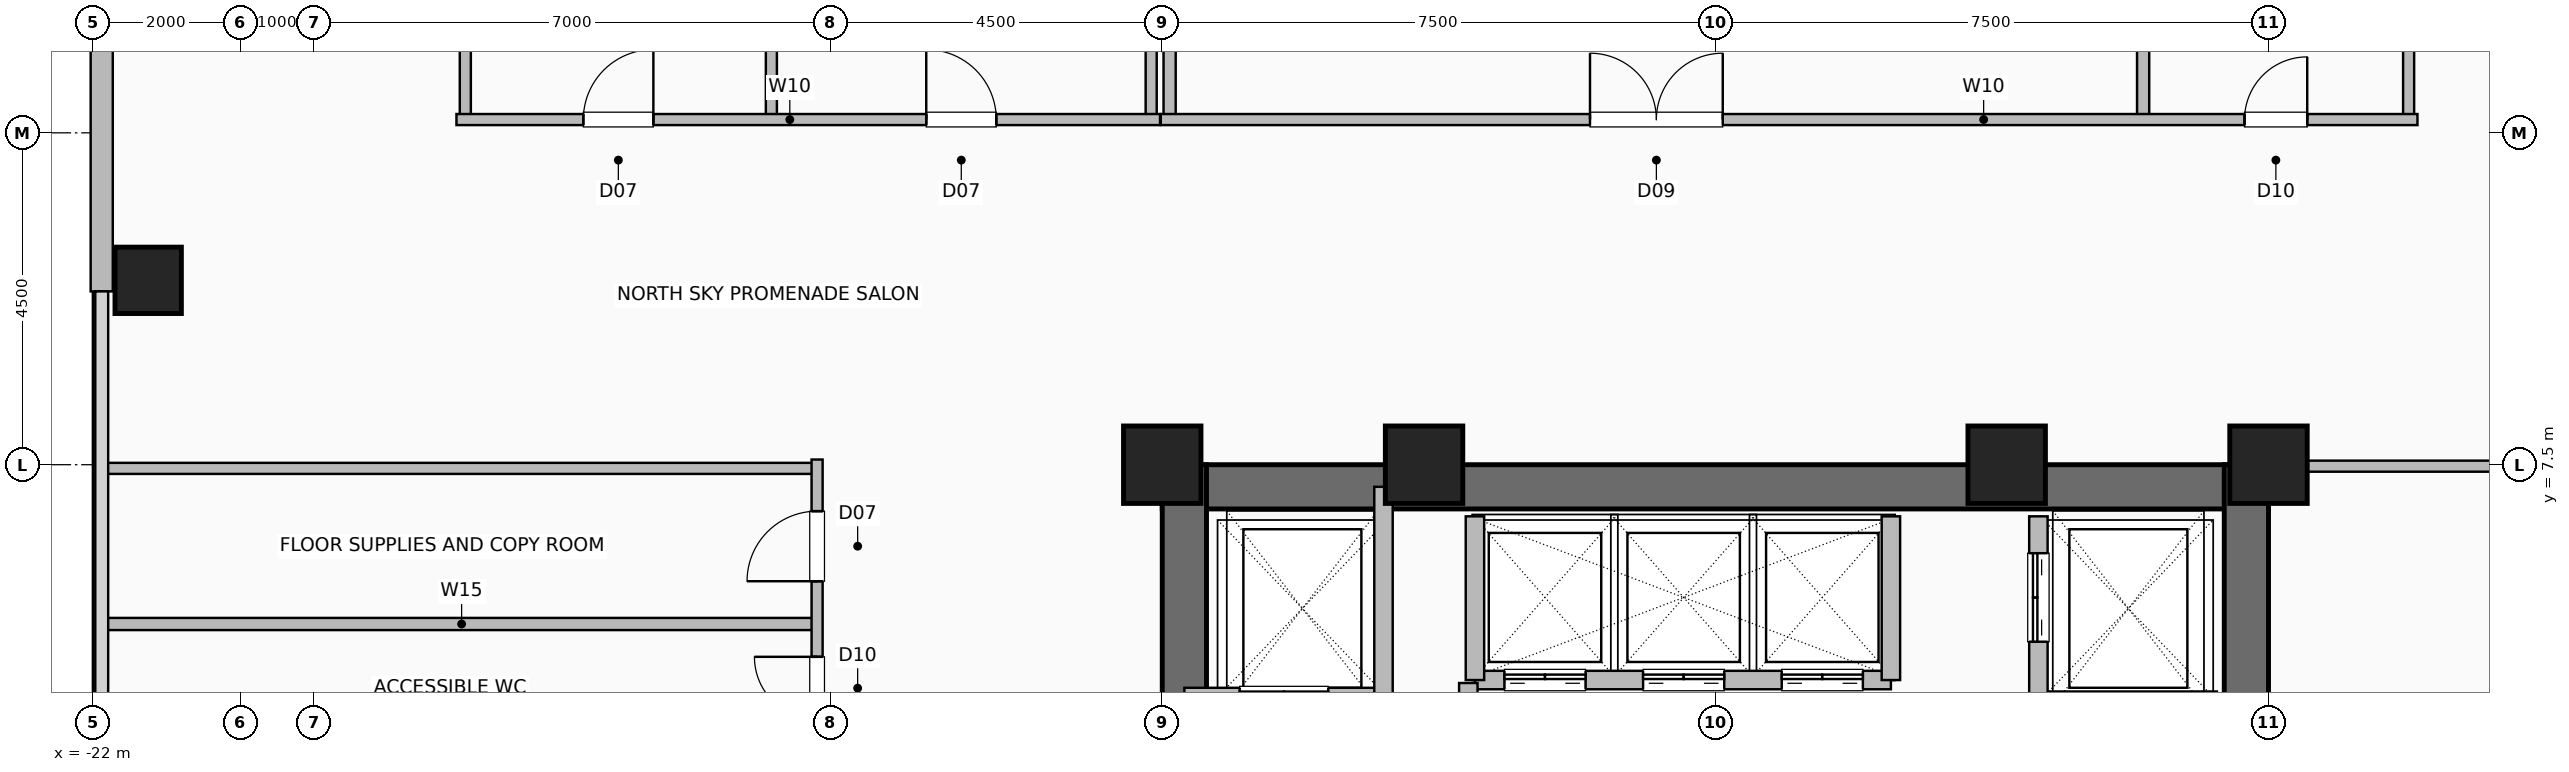
"""IFC4 building model, lengths in metres.
Left out: names, types, materials, properties, quantities, classifications, styles, units other than length and angle.
Written with IfcOpenShell. Run it as: python <this file> out.ifc"""

import sys

from ifc_helpers import new_model, si_unit, direction, frame, frame_2d, origin, origin_2d, place, context, subcontext, project, spatial, rectangle, hollow_rectangle, extrude, element, fill, save


model = new_model("IFC4")
c1 = context("Model", 3, precision=1e-05, world=origin(), true_north=direction((0.0, 1.0)))
c2 = subcontext(c1, "Body", "Model", "MODEL_VIEW")
j1 = project(units=[si_unit("LENGTHUNIT", "METRE"), si_unit("PLANEANGLEUNIT", "RADIAN")], contexts=[c1])
p1 = place(None, origin())
s1 = spatial("IfcSite", under=j1, at=p1, CompositionType="ELEMENT")
p2 = place(p1, origin())
s2 = spatial("IfcBuilding", under=s1, at=p2, CompositionType="ELEMENT")
p3 = place(p2, frame((0.0, 0.0, 144.4)))
s3 = spatial("IfcBuildingStorey", under=s2, at=p3, CompositionType="ELEMENT", Elevation=144.4)
for number, where, z_axis, x_axis in (
    (1, (7.5, 7.5, 0.0), (0.0, 0.0, 1.0), (1.0, 0.0, 0.0)),
    (2, (3.95, 7.5, 0.0), (0.0, 0.0, 1.0), (1.0, 0.0, 0.0)),
    (3, (-3.95, 7.5, 0.0), (0.0, 0.0, 1.0), (1.0, 0.0, 0.0)),
    (4, (-7.5, 7.5, 0.0), (0.0, 0.0, 1.0), (1.0, 0.0, 0.0)),
):
    element("IfcColumn", number, at=place(p3, frame(where, z_axis=z_axis, x_axis=x_axis)), inside=s3, PredefinedType="COLUMN", context=c2, shape_type="SweptSolid", body=[
        extrude(hollow_rectangle(XDim=1.05, YDim=1.05, WallThickness=0.05, at=origin_2d()), origin(), (0.0, 0.0, 1.0), 3.6),
    ])
p4 = place(p3, frame((-21.25, 10.0, 0.0), z_axis=(0.0, 0.0, 1.0), x_axis=(1.0, 0.0, 0.0)))
e5 = element("IfcColumn", 5, at=p4, inside=s3, PredefinedType="COLUMN", context=c2, shape_type="SweptSolid", body=[
    extrude(hollow_rectangle(XDim=0.9, YDim=0.9, WallThickness=0.045, at=origin_2d()), origin(), (0.0, 0.0, 1.0), 3.6),
])
p5 = place(p3, frame((-21.88, 9.85, 0.0), z_axis=(0.0, 0.0, 1.0), x_axis=(0.0, 1.0, 0.0)))
e6 = element("IfcWall", 6, at=p5, inside=s3, PredefinedType="SOLIDWALL", context=c2, shape_type="SweptSolid", body=[
    extrude(rectangle(XDim=6.3, YDim=0.3, at=frame_2d((3.15, 0.0))), origin(), (0.0, 0.0, 1.0), 3.36),
])
p6 = place(p3, frame((-7.5, 7.2, 0.0), z_axis=(0.0, 0.0, 1.0), x_axis=(1.0, 0.0, 0.0)))
e7 = element("IfcWall", 7, at=p6, inside=s3, PredefinedType="SHEAR", context=c2, shape_type="SweptSolid", body=[
    extrude(rectangle(XDim=15.0, YDim=0.6, at=frame_2d((7.5, 0.0))), origin(), (0.0, 0.0, 1.0), 3.36),
])
p7 = place(p3, frame((-7.2, -7.5, 0.0), z_axis=(0.0, 0.0, 1.0), x_axis=(0.0, 1.0, 0.0)))
e8 = element("IfcWall", 8, at=p7, inside=s3, PredefinedType="SHEAR", context=c2, shape_type="SweptSolid", body=[
    extrude(rectangle(XDim=15.0, YDim=0.6, at=frame_2d((7.5, 0.0))), origin(), (0.0, 0.0, 1.0), 3.36),
])
p8 = place(p7, frame((9.5, 0.0, 0.0)))
e9 = element("IfcOpeningElement", 9, at=p8, cuts=e8, PredefinedType="OPENING", context=c2, shape_type="SweptSolid", body=[
    extrude(rectangle(XDim=1.0, YDim=2.08, at=frame_2d((0.5, 1.04))), frame((0.0, 0.31, 0.0), z_axis=(0.0, -1.0, 0.0), x_axis=(1.0, 0.0, 0.0)), (0.0, 0.0, 1.0), 0.62),
])
p9 = place(p3, frame((7.2, -7.5, 0.0), z_axis=(0.0, 0.0, 1.0), x_axis=(0.0, 1.0, 0.0)))
e10 = element("IfcWall", 10, at=p9, inside=s3, PredefinedType="SHEAR", context=c2, shape_type="SweptSolid", body=[
    extrude(rectangle(XDim=15.0, YDim=0.6, at=frame_2d((7.5, 0.0))), origin(), (0.0, 0.0, 1.0), 3.36),
])
p10 = place(p3, frame((-3.26, 4.58, 0.0), z_axis=(0.0, 0.0, 1.0), x_axis=(1.0, 0.0, 0.0)))
e11 = element("IfcWall", 11, at=p10, inside=s3, PredefinedType="SHEAR", context=c2, shape_type="SweptSolid", body=[
    extrude(rectangle(XDim=5.64, YDim=0.25, at=frame_2d((2.82, 0.0))), origin(), (0.0, 0.0, 1.0), 3.36),
])
p11 = place(p10, frame((0.4, 0.0, 0.0)))
e12 = element("IfcOpeningElement", 12, at=p11, cuts=e11, PredefinedType="OPENING", context=c2, shape_type="SweptSolid", body=[
    extrude(rectangle(XDim=1.1, YDim=2.2, at=frame_2d((0.55, 1.1))), frame((0.0, 0.135, 0.0), z_axis=(0.0, -1.0, 0.0), x_axis=(1.0, 0.0, 0.0)), (0.0, 0.0, 1.0), 0.27),
])
p12 = place(p10, frame((2.28, 0.0, 0.0)))
e13 = element("IfcOpeningElement", 13, at=p12, cuts=e11, PredefinedType="OPENING", context=c2, shape_type="SweptSolid", body=[
    extrude(rectangle(XDim=1.1, YDim=2.2, at=frame_2d((0.55, 1.1))), frame((0.0, 0.135, 0.0), z_axis=(0.0, -1.0, 0.0), x_axis=(1.0, 0.0, 0.0)), (0.0, 0.0, 1.0), 0.27),
])
p13 = place(p10, frame((4.16, 0.0, 0.0)))
e14 = element("IfcOpeningElement", 14, at=p13, cuts=e11, PredefinedType="OPENING", context=c2, shape_type="SweptSolid", body=[
    extrude(rectangle(XDim=1.1, YDim=2.2, at=frame_2d((0.55, 1.1))), frame((0.0, 0.135, 0.0), z_axis=(0.0, -1.0, 0.0), x_axis=(1.0, 0.0, 0.0)), (0.0, 0.0, 1.0), 0.27),
])
for number, where, z_axis, x_axis in (
    (15, (-3.26, 4.58, 0.0), (0.0, 0.0, 1.0), (0.0, 1.0, 0.0)),
    (16, (2.38, 4.58, 0.0), (0.0, 0.0, 1.0), (0.0, 1.0, 0.0)),
):
    element("IfcWall", number, at=place(p3, frame(where, z_axis=z_axis, x_axis=x_axis)), inside=s3, PredefinedType="SHEAR", context=c2, shape_type="SweptSolid", body=[
        extrude(rectangle(XDim=2.22, YDim=0.25, at=frame_2d((1.11, 0.0))), origin(), (0.0, 0.0, 1.0), 3.36),
    ])
p14 = place(p3, frame((-7.2, 4.35, 0.0), z_axis=(0.0, 0.0, 1.0), x_axis=(1.0, 0.0, 0.0)))
e17 = element("IfcWall", 17, at=p14, inside=s3, PredefinedType="SHEAR", context=c2, shape_type="SweptSolid", body=[
    extrude(rectangle(XDim=2.7, YDim=0.25, at=frame_2d((1.35, 0.0))), origin(), (0.0, 0.0, 1.0), 3.36),
])
p15 = place(p14, frame((0.75, 0.0, 0.0)))
e18 = element("IfcOpeningElement", 18, at=p15, cuts=e17, PredefinedType="OPENING", context=c2, shape_type="SweptSolid", body=[
    extrude(rectangle(XDim=1.2, YDim=2.2, at=frame_2d((0.6, 1.1))), frame((0.0, 0.135, 0.0), z_axis=(0.0, -1.0, 0.0), x_axis=(1.0, 0.0, 0.0)), (0.0, 0.0, 1.0), 0.27),
])
p16 = place(p3, frame((-4.5, 4.35, 0.0), z_axis=(0.0, 0.0, 1.0), x_axis=(0.0, 1.0, 0.0)))
e19 = element("IfcWall", 19, at=p16, inside=s3, PredefinedType="SHEAR", context=c2, shape_type="SweptSolid", body=[
    extrude(rectangle(XDim=2.85, YDim=0.25, at=frame_2d((1.425, 0.0))), origin(), (0.0, 0.0, 1.0), 3.36),
])
p17 = place(p3, frame((4.38, 4.3, 0.0), z_axis=(0.0, 0.0, 1.0), x_axis=(1.0, 0.0, 0.0)))
e20 = element("IfcWall", 20, at=p17, inside=s3, PredefinedType="SHEAR", context=c2, shape_type="SweptSolid", body=[
    extrude(rectangle(XDim=2.42, YDim=0.25, at=frame_2d((1.21, 0.0))), origin(), (0.0, 0.0, 1.0), 3.36),
])
p18 = place(p3, frame((4.38, 4.3, 0.0), z_axis=(0.0, 0.0, 1.0), x_axis=(0.0, 1.0, 0.0)))
e21 = element("IfcWall", 21, at=p18, inside=s3, PredefinedType="SHEAR", context=c2, shape_type="SweptSolid", body=[
    extrude(rectangle(XDim=2.5, YDim=0.25, at=frame_2d((1.25, 0.0))), origin(), (0.0, 0.0, 1.0), 3.36),
])
p19 = place(p18, frame((0.8, 0.0, 0.0)))
e22 = element("IfcOpeningElement", 22, at=p19, cuts=e21, PredefinedType="OPENING", context=c2, shape_type="SweptSolid", body=[
    extrude(rectangle(XDim=1.2, YDim=2.2, at=frame_2d((0.6, 1.1))), frame((0.0, 0.135, 0.0), z_axis=(0.0, -1.0, 0.0), x_axis=(1.0, 0.0, 0.0)), (0.0, 0.0, 1.0), 0.27),
])
p20 = place(p3, frame((-3.35, 0.92, 0.0), z_axis=(0.0, 0.0, 1.0), x_axis=(0.0, 1.0, 0.0)))
e23 = element("IfcWall", 23, at=p20, inside=s3, PredefinedType="SHEAR", context=c2, shape_type="SweptSolid", body=[
    extrude(rectangle(XDim=3.62, YDim=0.25, at=frame_2d((1.81, 0.0))), origin(), (0.0, 0.0, 1.0), 3.36),
])
p21 = place(p20, frame((1.85, 0.0, 0.0)))
e24 = element("IfcOpeningElement", 24, at=p21, cuts=e23, PredefinedType="OPENING", context=c2, shape_type="SweptSolid", body=[
    extrude(rectangle(XDim=1.0, YDim=2.08, at=frame_2d((0.5, 1.04))), frame((0.0, 0.135, 0.0), z_axis=(0.0, -1.0, 0.0), x_axis=(1.0, 0.0, 0.0)), (0.0, 0.0, 1.0), 0.27),
])
p22 = place(p3, frame((-21.82, 5.34, 0.0), z_axis=(0.0, 0.0, 1.0), x_axis=(1.0, 0.0, 0.0)))
e25 = element("IfcWall", 25, at=p22, inside=s3, PredefinedType="PLUMBINGWALL", context=c2, shape_type="SweptSolid", body=[
    extrude(rectangle(XDim=9.64, YDim=0.165, at=frame_2d((4.82, 0.0))), origin(), (0.0, 0.0, 1.0), 3.36),
])
p23 = place(p3, frame((-21.82, 7.45, 0.0), z_axis=(0.0, 0.0, 1.0), x_axis=(1.0, 0.0, 0.0)))
e26 = element("IfcWall", 26, at=p23, inside=s3, PredefinedType="PARTITIONING", context=c2, shape_type="SweptSolid", body=[
    extrude(rectangle(XDim=9.64, YDim=0.15, at=frame_2d((4.82, 0.0))), origin(), (0.0, 0.0, 1.0), 3.36),
])
p24 = place(p3, frame((-12.18, -7.57, 0.0), z_axis=(0.0, 0.0, 1.0), x_axis=(0.0, 1.0, 0.0)))
e27 = element("IfcWall", 27, at=p24, inside=s3, PredefinedType="PARTITIONING", context=c2, shape_type="SweptSolid", body=[
    extrude(rectangle(XDim=15.14, YDim=0.15, at=frame_2d((7.57, 0.0))), origin(), (0.0, 0.0, 1.0), 3.36),
])
p25 = place(p24, frame((2.17, 0.0, 0.0)))
e28 = element("IfcOpeningElement", 28, at=p25, cuts=e27, PredefinedType="OPENING", context=c2, shape_type="SweptSolid", body=[
    extrude(rectangle(XDim=0.95, YDim=2.06, at=frame_2d((0.475, 1.03))), frame((0.0, 0.085, 0.0), z_axis=(0.0, -1.0, 0.0), x_axis=(1.0, 0.0, 0.0)), (0.0, 0.0, 1.0), 0.17),
])
p26 = place(p24, frame((7.695, 0.0, 0.0)))
e29 = element("IfcOpeningElement", 29, at=p26, cuts=e27, PredefinedType="OPENING", context=c2, shape_type="SweptSolid", body=[
    extrude(rectangle(XDim=0.95, YDim=2.06, at=frame_2d((0.475, 1.03))), frame((0.0, 0.085, 0.0), z_axis=(0.0, -1.0, 0.0), x_axis=(1.0, 0.0, 0.0)), (0.0, 0.0, 1.0), 0.17),
])
p27 = place(p24, frame((11.615, 0.0, 0.0)))
e30 = element("IfcOpeningElement", 30, at=p27, cuts=e27, PredefinedType="OPENING", context=c2, shape_type="SweptSolid", body=[
    extrude(rectangle(XDim=0.85, YDim=2.05, at=frame_2d((0.425, 1.025))), frame((0.0, 0.085, 0.0), z_axis=(0.0, -1.0, 0.0), x_axis=(1.0, 0.0, 0.0)), (0.0, 0.0, 1.0), 0.17),
])
p28 = place(p24, frame((13.49, 0.0, 0.0)))
e31 = element("IfcOpeningElement", 31, at=p28, cuts=e27, PredefinedType="OPENING", context=c2, shape_type="SweptSolid", body=[
    extrude(rectangle(XDim=0.95, YDim=2.06, at=frame_2d((0.475, 1.03))), frame((0.0, 0.085, 0.0), z_axis=(0.0, -1.0, 0.0), x_axis=(1.0, 0.0, 0.0)), (0.0, 0.0, 1.0), 0.17),
])
for number, where, z_axis, x_axis in (
    (32, (-16.95, 12.18, 0.0), (0.0, 0.0, 1.0), (0.0, 1.0, 0.0)),
    (33, (-12.8, 12.18, 0.0), (0.0, 0.0, 1.0), (0.0, 1.0, 0.0)),
    (34, (-7.65, 12.18, 0.0), (0.0, 0.0, 1.0), (0.0, 1.0, 0.0)),
):
    element("IfcWall", number, at=place(p3, frame(where, z_axis=z_axis, x_axis=x_axis)), inside=s3, PredefinedType="PARTITIONING", context=c2, shape_type="SweptSolid", body=[
        extrude(rectangle(XDim=9.64, YDim=0.15, at=frame_2d((4.82, 0.0))), origin(), (0.0, 0.0, 1.0), 3.36),
    ])
p29 = place(p3, frame((-17.07, 12.18, 0.0), z_axis=(0.0, 0.0, 1.0), x_axis=(1.0, 0.0, 0.0)))
e35 = element("IfcWall", 35, at=p29, inside=s3, PredefinedType="PARTITIONING", context=c2, shape_type="SweptSolid", body=[
    extrude(rectangle(XDim=9.54, YDim=0.15, at=frame_2d((4.77, 0.0))), origin(), (0.0, 0.0, 1.0), 3.36),
])
p30 = place(p29, frame((1.72, 0.0, 0.0)))
e36 = element("IfcOpeningElement", 36, at=p30, cuts=e35, PredefinedType="OPENING", context=c2, shape_type="SweptSolid", body=[
    extrude(rectangle(XDim=0.95, YDim=2.06, at=frame_2d((0.475, 1.03))), frame((0.0, 0.085, 0.0), z_axis=(0.0, -1.0, 0.0), x_axis=(1.0, 0.0, 0.0)), (0.0, 0.0, 1.0), 0.17),
])
p31 = place(p29, frame((6.37, 0.0, 0.0)))
e37 = element("IfcOpeningElement", 37, at=p31, cuts=e35, PredefinedType="OPENING", context=c2, shape_type="SweptSolid", body=[
    extrude(rectangle(XDim=0.95, YDim=2.06, at=frame_2d((0.475, 1.03))), frame((0.0, 0.085, 0.0), z_axis=(0.0, -1.0, 0.0), x_axis=(1.0, 0.0, 0.0)), (0.0, 0.0, 1.0), 0.17),
])
for number, where, z_axis, x_axis in (
    (38, (-7.4, 12.18, 0.0), (0.0, 0.0, 1.0), (0.0, 1.0, 0.0)),
    (39, (5.8, 12.18, 0.0), (0.0, 0.0, 1.0), (0.0, 1.0, 0.0)),
):
    element("IfcWall", number, at=place(p3, frame(where, z_axis=z_axis, x_axis=x_axis)), inside=s3, PredefinedType="PLUMBINGWALL", context=c2, shape_type="SweptSolid", body=[
        extrude(rectangle(XDim=9.64, YDim=0.165, at=frame_2d((4.82, 0.0))), origin(), (0.0, 0.0, 1.0), 3.36),
    ])
p32 = place(p3, frame((9.4, 12.18, 0.0), z_axis=(0.0, 0.0, 1.0), x_axis=(0.0, 1.0, 0.0)))
e40 = element("IfcWall", 40, at=p32, inside=s3, PredefinedType="PARTITIONING", context=c2, shape_type="SweptSolid", body=[
    extrude(rectangle(XDim=9.64, YDim=0.15, at=frame_2d((4.82, 0.0))), origin(), (0.0, 0.0, 1.0), 3.36),
])
p33 = place(p3, frame((-7.52, 12.18, 0.0), z_axis=(0.0, 0.0, 1.0), x_axis=(1.0, 0.0, 0.0)))
e41 = element("IfcWall", 41, at=p33, inside=s3, PredefinedType="PARTITIONING", context=c2, shape_type="SweptSolid", body=[
    extrude(rectangle(XDim=17.04, YDim=0.15, at=frame_2d((8.52, 0.0))), origin(), (0.0, 0.0, 1.0), 3.36),
])
p34 = place(p33, frame((5.82, 0.0, 0.0)))
e42 = element("IfcOpeningElement", 42, at=p34, cuts=e41, PredefinedType="OPENING", context=c2, shape_type="SweptSolid", body=[
    extrude(rectangle(XDim=1.8, YDim=2.08, at=frame_2d((0.9, 1.04))), frame((0.0, 0.085, 0.0), z_axis=(0.0, -1.0, 0.0), x_axis=(1.0, 0.0, 0.0)), (0.0, 0.0, 1.0), 0.17),
])
p35 = place(p33, frame((14.695, 0.0, 0.0)))
e43 = element("IfcOpeningElement", 43, at=p35, cuts=e41, PredefinedType="OPENING", context=c2, shape_type="SweptSolid", body=[
    extrude(rectangle(XDim=0.85, YDim=2.05, at=frame_2d((0.425, 1.025))), frame((0.0, 0.085, 0.0), z_axis=(0.0, -1.0, 0.0), x_axis=(1.0, 0.0, 0.0)), (0.0, 0.0, 1.0), 0.17),
])
p36 = place(p3, frame((7.6, 7.48, 0.0), z_axis=(0.0, 0.0, 1.0), x_axis=(1.0, 0.0, 0.0)))
e44 = element("IfcWall", 44, at=p36, inside=s3, PredefinedType="PARTITIONING", context=c2, shape_type="SweptSolid", body=[
    extrude(rectangle(XDim=14.22, YDim=0.15, at=frame_2d((7.11, 0.0))), origin(), (0.0, 0.0, 1.0), 3.36),
])
p37 = place(p11, origin())
e45 = element("IfcDoor", 45, at=p37, inside=s3, OperationType="DOUBLE_DOOR_SLIDING", PredefinedType="DOOR", context=c2, shape_type="SweptSolid", body=[
    extrude(rectangle(XDim=1.1, YDim=2.2, at=frame_2d((0.55, 1.1))), frame((0.0, 0.025, 0.0), z_axis=(0.0, -1.0, 0.0), x_axis=(1.0, 0.0, 0.0)), (0.0, 0.0, 1.0), 0.05),
])
fill(e12, e45)
p38 = place(p12, origin())
e46 = element("IfcDoor", 46, at=p38, inside=s3, OperationType="DOUBLE_DOOR_SLIDING", PredefinedType="DOOR", context=c2, shape_type="SweptSolid", body=[
    extrude(rectangle(XDim=1.1, YDim=2.2, at=frame_2d((0.55, 1.1))), frame((0.0, 0.025, 0.0), z_axis=(0.0, -1.0, 0.0), x_axis=(1.0, 0.0, 0.0)), (0.0, 0.0, 1.0), 0.05),
])
fill(e13, e46)
p39 = place(p13, origin())
e47 = element("IfcDoor", 47, at=p39, inside=s3, OperationType="DOUBLE_DOOR_SLIDING", PredefinedType="DOOR", context=c2, shape_type="SweptSolid", body=[
    extrude(rectangle(XDim=1.1, YDim=2.2, at=frame_2d((0.55, 1.1))), frame((0.0, 0.025, 0.0), z_axis=(0.0, -1.0, 0.0), x_axis=(1.0, 0.0, 0.0)), (0.0, 0.0, 1.0), 0.05),
])
fill(e14, e47)
p40 = place(p19, origin())
e48 = element("IfcDoor", 48, at=p40, inside=s3, OperationType="DOUBLE_DOOR_SLIDING", PredefinedType="DOOR", context=c2, shape_type="SweptSolid", body=[
    extrude(rectangle(XDim=1.2, YDim=2.2, at=frame_2d((0.6, 1.1))), frame((0.0, 0.025, 0.0), z_axis=(0.0, -1.0, 0.0), x_axis=(1.0, 0.0, 0.0)), (0.0, 0.0, 1.0), 0.05),
])
fill(e22, e48)
p41 = place(p27, origin())
e49 = element("IfcDoor", 49, at=p41, inside=s3, OperationType="SINGLE_SWING_RIGHT", PredefinedType="DOOR", context=c2, shape_type="SweptSolid", body=[
    extrude(rectangle(XDim=0.85, YDim=2.05, at=frame_2d((0.425, 1.025))), frame((0.0, 0.025, 0.0), z_axis=(0.0, -1.0, 0.0), x_axis=(1.0, 0.0, 0.0)), (0.0, 0.0, 1.0), 0.05),
])
fill(e30, e49)
p42 = place(p28, origin())
e50 = element("IfcDoor", 50, at=p42, inside=s3, OperationType="SINGLE_SWING_LEFT", PredefinedType="DOOR", context=c2, shape_type="SweptSolid", body=[
    extrude(rectangle(XDim=0.95, YDim=2.06, at=frame_2d((0.475, 1.03))), frame((0.0, 0.025, 0.0), z_axis=(0.0, -1.0, 0.0), x_axis=(1.0, 0.0, 0.0)), (0.0, 0.0, 1.0), 0.05),
])
fill(e31, e50)
p43 = place(p30, origin())
e51 = element("IfcDoor", 51, at=p43, inside=s3, OperationType="SINGLE_SWING_RIGHT", PredefinedType="DOOR", context=c2, shape_type="SweptSolid", body=[
    extrude(rectangle(XDim=0.95, YDim=2.06, at=frame_2d((0.475, 1.03))), frame((0.0, 0.025, 0.0), z_axis=(0.0, -1.0, 0.0), x_axis=(1.0, 0.0, 0.0)), (0.0, 0.0, 1.0), 0.05),
])
fill(e36, e51)
p44 = place(p31, origin())
e52 = element("IfcDoor", 52, at=p44, inside=s3, OperationType="SINGLE_SWING_LEFT", PredefinedType="DOOR", context=c2, shape_type="SweptSolid", body=[
    extrude(rectangle(XDim=0.95, YDim=2.06, at=frame_2d((0.475, 1.03))), frame((0.0, 0.025, 0.0), z_axis=(0.0, -1.0, 0.0), x_axis=(1.0, 0.0, 0.0)), (0.0, 0.0, 1.0), 0.05),
])
fill(e37, e52)
p45 = place(p34, origin())
e53 = element("IfcDoor", 53, at=p45, inside=s3, OperationType="DOUBLE_DOOR_SINGLE_SWING", PredefinedType="DOOR", context=c2, shape_type="SweptSolid", body=[
    extrude(rectangle(XDim=1.8, YDim=2.08, at=frame_2d((0.9, 1.04))), frame((0.0, 0.025, 0.0), z_axis=(0.0, -1.0, 0.0), x_axis=(1.0, 0.0, 0.0)), (0.0, 0.0, 1.0), 0.05),
])
fill(e42, e53)
p46 = place(p35, origin())
e54 = element("IfcDoor", 54, at=p46, inside=s3, OperationType="SINGLE_SWING_RIGHT", PredefinedType="DOOR", context=c2, shape_type="SweptSolid", body=[
    extrude(rectangle(XDim=0.85, YDim=2.05, at=frame_2d((0.425, 1.025))), frame((0.0, 0.025, 0.0), z_axis=(0.0, -1.0, 0.0), x_axis=(1.0, 0.0, 0.0)), (0.0, 0.0, 1.0), 0.05),
])
fill(e43, e54)
save(model, sys.argv[1])
